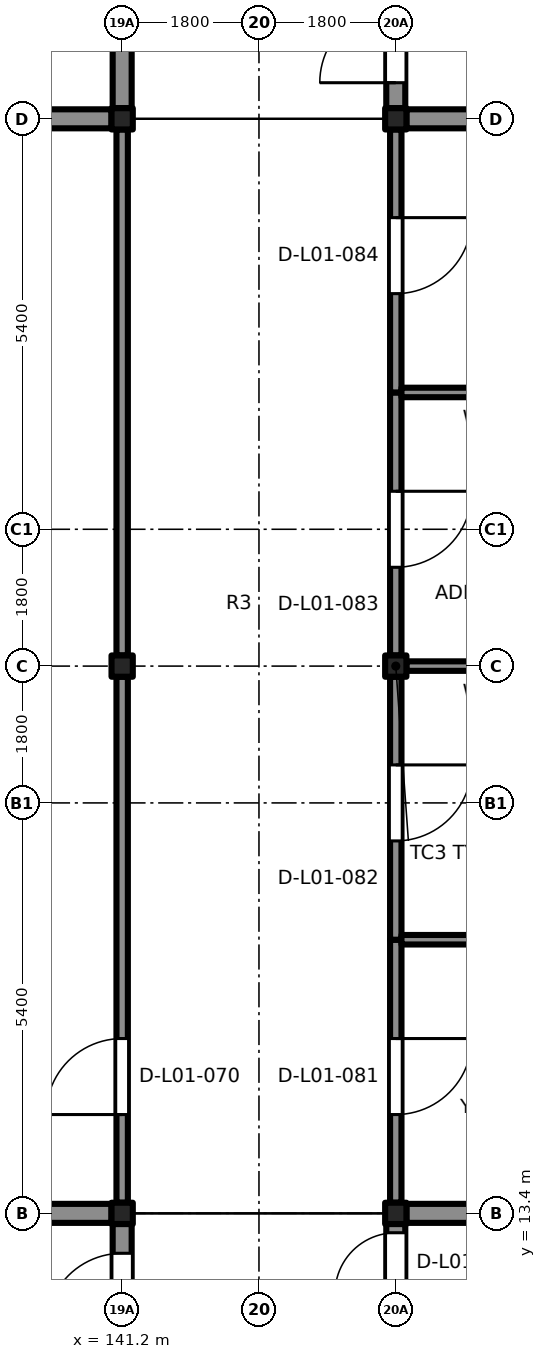
"""IFC4 building model, lengths in metres.
Left out: names, types, materials, properties, quantities, classifications, styles, units other than length and angle.
Written with IfcOpenShell. Run it as: python <this file> out.ifc"""

import sys

from ifc_helpers import new_model, si_unit, direction, frame, frame_2d, origin, origin_2d, place, context, subcontext, project, spatial, rectangle, extrude, element, fill, save


model = new_model("IFC4")
c1 = context("Model", 3, precision=1e-05, world=origin(), true_north=direction((0.0, 1.0)))
c2 = subcontext(c1, "Body", "Model", "MODEL_VIEW")
j1 = project(units=[si_unit("LENGTHUNIT", "METRE"), si_unit("PLANEANGLEUNIT", "RADIAN")], contexts=[c1])
p1 = place(None, origin())
s1 = spatial("IfcSite", under=j1, at=p1, CompositionType="ELEMENT")
p2 = place(p1, origin())
s2 = spatial("IfcBuilding", under=s1, at=p2, CompositionType="ELEMENT")
p3 = place(p2, frame((0.0, 0.0, 6.3)))
s3 = spatial("IfcBuildingStorey", under=s2, at=p3, CompositionType="ELEMENT", Elevation=6.3)
for number, where, z_axis, x_axis in (
    (1, (141.2, 13.4, 0.0), (0.0, 0.0, 1.0), (1.0, 0.0, 0.0)),
    (2, (144.8, 13.4, 0.0), (0.0, 0.0, 1.0), (1.0, 0.0, 0.0)),
    (3, (141.2, 20.6, 0.0), (0.0, 0.0, 1.0), (1.0, 0.0, 0.0)),
    (4, (144.8, 20.6, 0.0), (0.0, 0.0, 1.0), (1.0, 0.0, 0.0)),
    (5, (141.2, 27.8, 0.0), (0.0, 0.0, 1.0), (1.0, 0.0, 0.0)),
    (6, (144.8, 27.8, 0.0), (0.0, 0.0, 1.0), (1.0, 0.0, 0.0)),
):
    element("IfcColumn", number, at=place(p3, frame(where, z_axis=z_axis, x_axis=x_axis)), inside=s3, PredefinedType="COLUMN", context=c2, shape_type="SweptSolid", body=[
        extrude(rectangle(XDim=0.28, YDim=0.28, at=origin_2d()), origin(), (0.0, 0.0, 1.0), 3.9),
    ])
p4 = place(p3, frame((141.2, 6.365, 0.0), z_axis=(0.0, 0.0, 1.0), x_axis=(0.0, 1.0, 0.0)))
e7 = element("IfcWall", 7, at=p4, inside=s3, PredefinedType="SHEAR", context=c2, shape_type="SweptSolid", body=[
    extrude(rectangle(XDim=6.895, YDim=0.25, at=frame_2d((3.448, 0.0))), origin(), (0.0, 0.0, 1.0), 3.65),
])
p5 = place(p4, frame((5.51, 0.0, 0.0)))
e8 = element("IfcOpeningElement", 8, at=p5, cuts=e7, PredefinedType="OPENING", context=c2, shape_type="SweptSolid", body=[
    extrude(rectangle(XDim=1.0, YDim=2.1, at=frame_2d((0.5, 1.05))), frame((0.0, 0.135, 0.0), z_axis=(0.0, -1.0, 0.0), x_axis=(1.0, 0.0, 0.0)), (0.0, 0.0, 1.0), 0.27),
])
p6 = place(p3, frame((135.94, 13.4, 0.0), z_axis=(0.0, 0.0, 1.0), x_axis=(1.0, 0.0, 0.0)))
e9 = element("IfcWall", 9, at=p6, inside=s3, PredefinedType="SHEAR", context=c2, shape_type="SweptSolid", body=[
    extrude(rectangle(XDim=5.12, YDim=0.25, at=frame_2d((2.56, 0.0))), origin(), (0.0, 0.0, 1.0), 3.65),
])
p7 = place(p3, frame((144.8, 6.365, 0.0), z_axis=(0.0, 0.0, 1.0), x_axis=(0.0, 1.0, 0.0)))
e10 = element("IfcWall", 10, at=p7, inside=s3, PredefinedType="SHEAR", context=c2, shape_type="SweptSolid", body=[
    extrude(rectangle(XDim=6.895, YDim=0.25, at=frame_2d((3.448, 0.0))), origin(), (0.0, 0.0, 1.0), 3.65),
])
p8 = place(p7, frame((0.75, 0.0, 0.0)))
e11 = element("IfcOpeningElement", 11, at=p8, cuts=e10, PredefinedType="OPENING", context=c2, shape_type="SweptSolid", body=[
    extrude(rectangle(XDim=1.0, YDim=2.1, at=frame_2d((0.5, 1.05))), frame((0.0, 0.135, 0.0), z_axis=(0.0, -1.0, 0.0), x_axis=(1.0, 0.0, 0.0)), (0.0, 0.0, 1.0), 0.27),
])
p9 = place(p7, frame((3.15, 0.0, 0.0)))
e12 = element("IfcOpeningElement", 12, at=p9, cuts=e10, PredefinedType="OPENING", context=c2, shape_type="SweptSolid", body=[
    extrude(rectangle(XDim=0.9, YDim=2.1, at=frame_2d((0.45, 1.05))), frame((0.0, 0.135, 0.0), z_axis=(0.0, -1.0, 0.0), x_axis=(1.0, 0.0, 0.0)), (0.0, 0.0, 1.0), 0.27),
])
p10 = place(p7, frame((4.8, 0.0, 0.0)))
e13 = element("IfcOpeningElement", 13, at=p10, cuts=e10, PredefinedType="OPENING", context=c2, shape_type="SweptSolid", body=[
    extrude(rectangle(XDim=0.8, YDim=2.1, at=frame_2d((0.4, 1.05))), frame((0.0, 0.135, 0.0), z_axis=(0.0, -1.0, 0.0), x_axis=(1.0, 0.0, 0.0)), (0.0, 0.0, 1.0), 0.27),
])
p11 = place(p7, frame((5.98, 0.0, 0.0)))
e14 = element("IfcOpeningElement", 14, at=p11, cuts=e10, PredefinedType="OPENING", context=c2, shape_type="SweptSolid", body=[
    extrude(rectangle(XDim=0.8, YDim=2.1, at=frame_2d((0.4, 1.05))), frame((0.0, 0.135, 0.0), z_axis=(0.0, -1.0, 0.0), x_axis=(1.0, 0.0, 0.0)), (0.0, 0.0, 1.0), 0.27),
])
p12 = place(p3, frame((144.94, 13.4, 0.0), z_axis=(0.0, 0.0, 1.0), x_axis=(1.0, 0.0, 0.0)))
e15 = element("IfcWall", 15, at=p12, inside=s3, PredefinedType="SHEAR", context=c2, shape_type="SweptSolid", body=[
    extrude(rectangle(XDim=5.12, YDim=0.25, at=frame_2d((2.56, 0.0))), origin(), (0.0, 0.0, 1.0), 3.65),
])
p13 = place(p3, frame((144.8, 27.94, 0.0), z_axis=(0.0, 0.0, 1.0), x_axis=(0.0, 1.0, 0.0)))
e16 = element("IfcWall", 16, at=p13, inside=s3, PredefinedType="SHEAR", context=c2, shape_type="SweptSolid", body=[
    extrude(rectangle(XDim=6.92, YDim=0.25, at=frame_2d((3.46, 0.0))), origin(), (0.0, 0.0, 1.0), 3.65),
])
p14 = place(p13, frame((0.335, 0.0, 0.0)))
e17 = element("IfcOpeningElement", 17, at=p14, cuts=e16, PredefinedType="OPENING", context=c2, shape_type="SweptSolid", body=[
    extrude(rectangle(XDim=1.0, YDim=2.1, at=frame_2d((0.5, 1.05))), frame((0.0, 0.135, 0.0), z_axis=(0.0, -1.0, 0.0), x_axis=(1.0, 0.0, 0.0)), (0.0, 0.0, 1.0), 0.27),
])
p15 = place(p3, frame((144.94, 27.8, 0.0), z_axis=(0.0, 0.0, 1.0), x_axis=(1.0, 0.0, 0.0)))
e18 = element("IfcWall", 18, at=p15, inside=s3, PredefinedType="SHEAR", context=c2, shape_type="SweptSolid", body=[
    extrude(rectangle(XDim=5.12, YDim=0.25, at=frame_2d((2.56, 0.0))), origin(), (0.0, 0.0, 1.0), 3.65),
])
p16 = place(p3, frame((141.2, 27.94, 0.0), z_axis=(0.0, 0.0, 1.0), x_axis=(0.0, 1.0, 0.0)))
e19 = element("IfcWall", 19, at=p16, inside=s3, PredefinedType="SHEAR", context=c2, shape_type="SweptSolid", body=[
    extrude(rectangle(XDim=6.92, YDim=0.25, at=frame_2d((3.46, 0.0))), origin(), (0.0, 0.0, 1.0), 3.65),
])
p17 = place(p16, frame((4.16, 0.0, 0.0)))
e20 = element("IfcOpeningElement", 20, at=p17, cuts=e19, PredefinedType="OPENING", context=c2, shape_type="SweptSolid", body=[
    extrude(rectangle(XDim=1.8, YDim=2.1, at=frame_2d((0.9, 1.05))), frame((0.0, 0.135, 0.0), z_axis=(0.0, -1.0, 0.0), x_axis=(1.0, 0.0, 0.0)), (0.0, 0.0, 1.0), 0.27),
])
p18 = place(p3, frame((135.94, 27.8, 0.0), z_axis=(0.0, 0.0, 1.0), x_axis=(1.0, 0.0, 0.0)))
e21 = element("IfcWall", 21, at=p18, inside=s3, PredefinedType="SHEAR", context=c2, shape_type="SweptSolid", body=[
    extrude(rectangle(XDim=5.12, YDim=0.25, at=frame_2d((2.56, 0.0))), origin(), (0.0, 0.0, 1.0), 3.65),
])
p19 = place(p3, frame((141.2, 13.54, 0.0), z_axis=(0.0, 0.0, 1.0), x_axis=(0.0, 1.0, 0.0)))
e22 = element("IfcWall", 22, at=p19, inside=s3, PredefinedType="PARTITIONING", context=c2, shape_type="SweptSolid", body=[
    extrude(rectangle(XDim=6.92, YDim=0.15, at=frame_2d((3.46, 0.0))), origin(), (0.0, 0.0, 1.0), 3.22),
])
p20 = place(p19, frame((1.16, 0.0, 0.0)))
e23 = element("IfcOpeningElement", 23, at=p20, cuts=e22, PredefinedType="OPENING", context=c2, shape_type="SweptSolid", body=[
    extrude(rectangle(XDim=1.0, YDim=2.1, at=frame_2d((0.5, 1.05))), frame((0.0, 0.085, 0.0), z_axis=(0.0, -1.0, 0.0), x_axis=(1.0, 0.0, 0.0)), (0.0, 0.0, 1.0), 0.17),
])
p21 = place(p3, frame((141.2, 20.74, 0.0), z_axis=(0.0, 0.0, 1.0), x_axis=(0.0, 1.0, 0.0)))
e24 = element("IfcWall", 24, at=p21, inside=s3, PredefinedType="PARTITIONING", context=c2, shape_type="SweptSolid", body=[
    extrude(rectangle(XDim=6.92, YDim=0.15, at=frame_2d((3.46, 0.0))), origin(), (0.0, 0.0, 1.0), 3.22),
])
p22 = place(p3, frame((144.8, 17.0, 0.0), z_axis=(0.0, 0.0, 1.0), x_axis=(0.0, -1.0, 0.0)))
e25 = element("IfcWall", 25, at=p22, inside=s3, PredefinedType="PARTITIONING", context=c2, shape_type="SweptSolid", body=[
    extrude(rectangle(XDim=3.46, YDim=0.15, at=frame_2d((1.73, 0.0))), origin(), (0.0, 0.0, 1.0), 3.22),
])
p23 = place(p22, frame((1.3, 0.0, 0.0)))
e26 = element("IfcOpeningElement", 26, at=p23, cuts=e25, PredefinedType="OPENING", context=c2, shape_type="SweptSolid", body=[
    extrude(rectangle(XDim=1.0, YDim=2.1, at=frame_2d((0.5, 1.05))), frame((0.0, 0.085, 0.0), z_axis=(0.0, -1.0, 0.0), x_axis=(1.0, 0.0, 0.0)), (0.0, 0.0, 1.0), 0.17),
])
p24 = place(p3, frame((144.8, 20.46, 0.0), z_axis=(0.0, 0.0, 1.0), x_axis=(0.0, -1.0, 0.0)))
e27 = element("IfcWall", 27, at=p24, inside=s3, PredefinedType="PARTITIONING", context=c2, shape_type="SweptSolid", body=[
    extrude(rectangle(XDim=3.46, YDim=0.15, at=frame_2d((1.73, 0.0))), origin(), (0.0, 0.0, 1.0), 3.22),
])
p25 = place(p24, frame((1.16, 0.0, 0.0)))
e28 = element("IfcOpeningElement", 28, at=p25, cuts=e27, PredefinedType="OPENING", context=c2, shape_type="SweptSolid", body=[
    extrude(rectangle(XDim=1.0, YDim=2.1, at=frame_2d((0.5, 1.05))), frame((0.0, 0.085, 0.0), z_axis=(0.0, -1.0, 0.0), x_axis=(1.0, 0.0, 0.0)), (0.0, 0.0, 1.0), 0.17),
])
p26 = place(p3, frame((150.035, 17.0, 0.0), z_axis=(0.0, 0.0, 1.0), x_axis=(-1.0, 0.0, 0.0)))
e29 = element("IfcWall", 29, at=p26, inside=s3, PredefinedType="PARTITIONING", context=c2, shape_type="SweptSolid", body=[
    extrude(rectangle(XDim=5.16, YDim=0.125, at=frame_2d((2.58, 0.0))), origin(), (0.0, 0.0, 1.0), 3.38),
])
p27 = place(p3, frame((144.8, 24.2, 0.0), z_axis=(0.0, 0.0, 1.0), x_axis=(0.0, -1.0, 0.0)))
e30 = element("IfcWall", 30, at=p27, inside=s3, PredefinedType="PARTITIONING", context=c2, shape_type="SweptSolid", body=[
    extrude(rectangle(XDim=3.46, YDim=0.15, at=frame_2d((1.73, 0.0))), origin(), (0.0, 0.0, 1.0), 3.22),
])
p28 = place(p27, frame((1.3, 0.0, 0.0)))
e31 = element("IfcOpeningElement", 31, at=p28, cuts=e30, PredefinedType="OPENING", context=c2, shape_type="SweptSolid", body=[
    extrude(rectangle(XDim=1.0, YDim=2.1, at=frame_2d((0.5, 1.05))), frame((0.0, 0.085, 0.0), z_axis=(0.0, -1.0, 0.0), x_axis=(1.0, 0.0, 0.0)), (0.0, 0.0, 1.0), 0.17),
])
p29 = place(p3, frame((150.035, 20.6, 0.0), z_axis=(0.0, 0.0, 1.0), x_axis=(-1.0, 0.0, 0.0)))
e32 = element("IfcWall", 32, at=p29, inside=s3, PredefinedType="PARTITIONING", context=c2, shape_type="SweptSolid", body=[
    extrude(rectangle(XDim=5.095, YDim=0.125, at=frame_2d((2.547, 0.0))), origin(), (0.0, 0.0, 1.0), 3.38),
])
p30 = place(p3, frame((144.8, 27.66, 0.0), z_axis=(0.0, 0.0, 1.0), x_axis=(0.0, -1.0, 0.0)))
e33 = element("IfcWall", 33, at=p30, inside=s3, PredefinedType="PARTITIONING", context=c2, shape_type="SweptSolid", body=[
    extrude(rectangle(XDim=3.46, YDim=0.15, at=frame_2d((1.73, 0.0))), origin(), (0.0, 0.0, 1.0), 3.22),
])
p31 = place(p30, frame((1.16, 0.0, 0.0)))
e34 = element("IfcOpeningElement", 34, at=p31, cuts=e33, PredefinedType="OPENING", context=c2, shape_type="SweptSolid", body=[
    extrude(rectangle(XDim=1.0, YDim=2.1, at=frame_2d((0.5, 1.05))), frame((0.0, 0.085, 0.0), z_axis=(0.0, -1.0, 0.0), x_axis=(1.0, 0.0, 0.0)), (0.0, 0.0, 1.0), 0.17),
])
p32 = place(p3, frame((150.035, 24.2, 0.0), z_axis=(0.0, 0.0, 1.0), x_axis=(-1.0, 0.0, 0.0)))
e35 = element("IfcWall", 35, at=p32, inside=s3, PredefinedType="PARTITIONING", context=c2, shape_type="SweptSolid", body=[
    extrude(rectangle(XDim=5.16, YDim=0.125, at=frame_2d((2.58, 0.0))), origin(), (0.0, 0.0, 1.0), 3.38),
])
p33 = place(p5, origin())
e36 = element("IfcDoor", 36, at=p33, inside=s3, OperationType="SINGLE_SWING_RIGHT", PredefinedType="DOOR", context=c2, shape_type="SweptSolid", body=[
    extrude(rectangle(XDim=1.0, YDim=2.1, at=frame_2d((0.5, 1.05))), frame((0.0, 0.025, 0.0), z_axis=(0.0, -1.0, 0.0), x_axis=(1.0, 0.0, 0.0)), (0.0, 0.0, 1.0), 0.05),
])
fill(e8, e36)
p34 = place(p11, origin())
e37 = element("IfcDoor", 37, at=p34, inside=s3, OperationType="SINGLE_SWING_LEFT", PredefinedType="DOOR", context=c2, shape_type="SweptSolid", body=[
    extrude(rectangle(XDim=0.8, YDim=2.1, at=frame_2d((0.4, 1.05))), frame((0.0, 0.025, 0.0), z_axis=(0.0, -1.0, 0.0), x_axis=(1.0, 0.0, 0.0)), (0.0, 0.0, 1.0), 0.05),
])
fill(e14, e37)
p35 = place(p14, origin())
e38 = element("IfcDoor", 38, at=p35, inside=s3, OperationType="SINGLE_SWING_LEFT", PredefinedType="DOOR", context=c2, shape_type="SweptSolid", body=[
    extrude(rectangle(XDim=1.0, YDim=2.1, at=frame_2d((0.5, 1.05))), frame((0.0, 0.025, 0.0), z_axis=(0.0, -1.0, 0.0), x_axis=(1.0, 0.0, 0.0)), (0.0, 0.0, 1.0), 0.05),
])
fill(e17, e38)
p36 = place(p20, origin())
e39 = element("IfcDoor", 39, at=p36, inside=s3, OperationType="SINGLE_SWING_LEFT", PredefinedType="DOOR", context=c2, shape_type="SweptSolid", body=[
    extrude(rectangle(XDim=1.0, YDim=2.1, at=frame_2d((0.5, 1.05))), frame((0.0, 0.025, 0.0), z_axis=(0.0, -1.0, 0.0), x_axis=(1.0, 0.0, 0.0)), (0.0, 0.0, 1.0), 0.05),
])
fill(e23, e39)
p37 = place(p23, origin())
e40 = element("IfcDoor", 40, at=p37, inside=s3, OperationType="SINGLE_SWING_RIGHT", PredefinedType="DOOR", context=c2, shape_type="SweptSolid", body=[
    extrude(rectangle(XDim=1.0, YDim=2.1, at=frame_2d((0.5, 1.05))), frame((0.0, 0.025, 0.0), z_axis=(0.0, -1.0, 0.0), x_axis=(1.0, 0.0, 0.0)), (0.0, 0.0, 1.0), 0.05),
])
fill(e26, e40)
p38 = place(p25, origin())
e41 = element("IfcDoor", 41, at=p38, inside=s3, OperationType="SINGLE_SWING_LEFT", PredefinedType="DOOR", context=c2, shape_type="SweptSolid", body=[
    extrude(rectangle(XDim=1.0, YDim=2.1, at=frame_2d((0.5, 1.05))), frame((0.0, 0.025, 0.0), z_axis=(0.0, -1.0, 0.0), x_axis=(1.0, 0.0, 0.0)), (0.0, 0.0, 1.0), 0.05),
])
fill(e28, e41)
p39 = place(p28, origin())
e42 = element("IfcDoor", 42, at=p39, inside=s3, OperationType="SINGLE_SWING_RIGHT", PredefinedType="DOOR", context=c2, shape_type="SweptSolid", body=[
    extrude(rectangle(XDim=1.0, YDim=2.1, at=frame_2d((0.5, 1.05))), frame((0.0, 0.025, 0.0), z_axis=(0.0, -1.0, 0.0), x_axis=(1.0, 0.0, 0.0)), (0.0, 0.0, 1.0), 0.05),
])
fill(e31, e42)
p40 = place(p31, origin())
e43 = element("IfcDoor", 43, at=p40, inside=s3, OperationType="SINGLE_SWING_LEFT", PredefinedType="DOOR", context=c2, shape_type="SweptSolid", body=[
    extrude(rectangle(XDim=1.0, YDim=2.1, at=frame_2d((0.5, 1.05))), frame((0.0, 0.025, 0.0), z_axis=(0.0, -1.0, 0.0), x_axis=(1.0, 0.0, 0.0)), (0.0, 0.0, 1.0), 0.05),
])
fill(e34, e43)
save(model, sys.argv[1])
